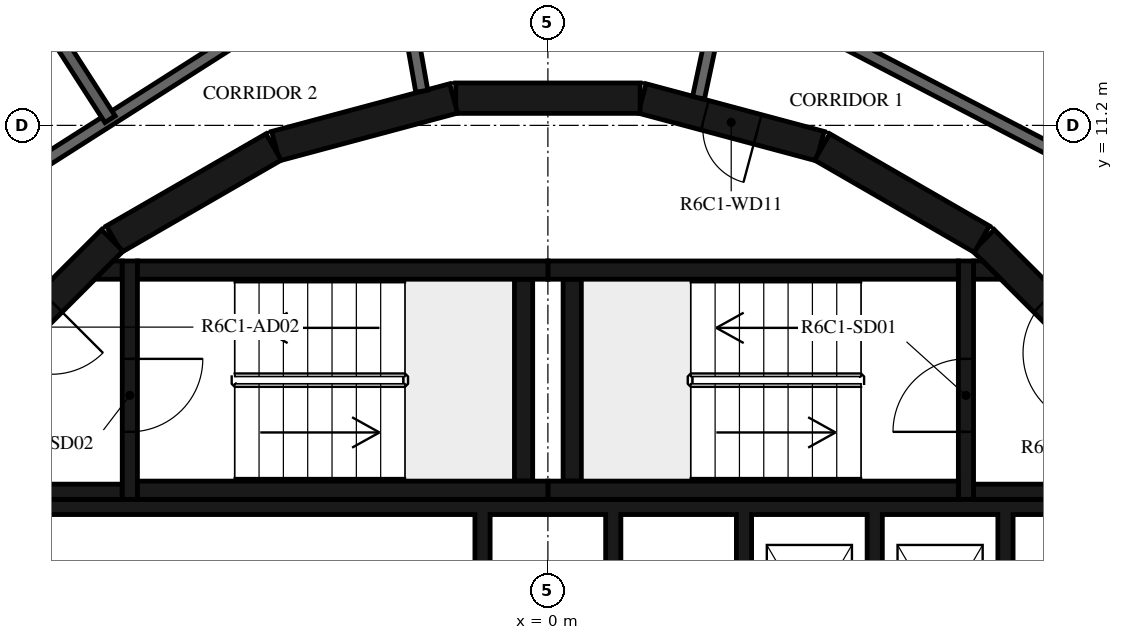
"""IFC4 building model, lengths in metres.
Left out: names, types, materials, properties, quantities, classifications, styles, units other than length and angle.
Written with IfcOpenShell. Run it as: python <this file> out.ifc"""

import sys

from ifc_helpers import new_model, si_unit, direction, frame, frame_2d, origin, place, context, subcontext, project, spatial, polyline, rectangle, outline, extrude, element, fill, save


model = new_model("IFC4")
c1 = context("Model", 3, precision=1e-05, world=origin(), true_north=direction((0.0, 1.0)))
c2 = subcontext(c1, "Body", "Model", "MODEL_VIEW")
j1 = project(units=[si_unit("LENGTHUNIT", "METRE"), si_unit("PLANEANGLEUNIT", "RADIAN")], contexts=[c1])
p1 = place(None, origin())
s1 = spatial("IfcSite", under=j1, at=p1, CompositionType="ELEMENT")
p2 = place(p1, origin())
s2 = spatial("IfcBuilding", under=s1, at=p2, CompositionType="ELEMENT")
p3 = place(p2, frame((0.0, 0.0, 251.2)))
s3 = spatial("IfcBuildingStorey", under=s2, at=p3, CompositionType="ELEMENT", Elevation=251.2)
p4 = place(p3, frame((9.308, 7.164, 0.0), z_axis=(0.0, 0.0, 1.0), x_axis=(-0.707106781187, 0.707106781187, 0.0)))
e1 = element("IfcWall", 1, at=p4, inside=s3, PredefinedType="SHEAR", context=c2, shape_type="SweptSolid", body=[
    extrude(rectangle(XDim=3.032, YDim=0.5, at=frame_2d((1.516, 0.0))), origin(), (0.0, 0.0, 1.0), 3.12),
])
p5 = place(p4, frame((0.416, 0.0, 0.0)))
e2 = element("IfcOpeningElement", 2, at=p5, cuts=e1, PredefinedType="OPENING", context=c2, shape_type="SweptSolid", body=[
    extrude(rectangle(XDim=1.2, YDim=2.1, at=frame_2d((0.6, 1.05))), frame((0.0, 0.26, 0.0), z_axis=(0.0, -1.0, 0.0), x_axis=(1.0, 0.0, 0.0)), (0.0, 0.0, 1.0), 0.52),
])
p6 = place(p3, frame((7.137, 9.329, 0.0), z_axis=(0.0, 0.0, 1.0), x_axis=(-0.865975092491, 0.500087131594, 0.0)))
e3 = element("IfcWall", 3, at=p6, inside=s3, PredefinedType="SHEAR", context=c2, shape_type="SweptSolid", body=[
    extrude(rectangle(XDim=3.033, YDim=0.5, at=frame_2d((1.516, 0.0))), origin(), (0.0, 0.0, 1.0), 3.12),
])
p7 = place(p3, frame((4.479, 10.858, 0.0), z_axis=(0.0, 0.0, 1.0), x_axis=(-0.965948410781, 0.258734743916, 0.0)))
e4 = element("IfcWall", 4, at=p7, inside=s3, PredefinedType="SHEAR", context=c2, shape_type="SweptSolid", body=[
    extrude(rectangle(XDim=3.033, YDim=0.5, at=frame_2d((1.516, 0.0))), origin(), (0.0, 0.0, 1.0), 3.12),
])
p8 = place(p7, frame((1.066, 0.0, 0.0)))
e5 = element("IfcOpeningElement", 5, at=p8, cuts=e4, PredefinedType="OPENING", context=c2, shape_type="SweptSolid", body=[
    extrude(rectangle(XDim=0.9, YDim=2.1, at=frame_2d((0.45, 1.05))), frame((0.0, 0.26, 0.0), z_axis=(0.0, -1.0, 0.0), x_axis=(1.0, 0.0, 0.0)), (0.0, 0.0, 1.0), 0.52),
])
for number, where, z_axis, x_axis in (
    (6, (1.516, 11.647, 0.0), (0.0, 0.0, 1.0), (-1.0, 0.0, 0.0)),
    (7, (-1.55, 11.643, 0.0), (0.0, 0.0, 1.0), (-0.966, -0.259, 0.0)),
    (8, (-4.51, 10.845, 0.0), (0.0, 0.0, 1.0), (-0.866, -0.5, 0.0)),
):
    element("IfcWall", number, at=place(p3, frame(where, z_axis=z_axis, x_axis=x_axis)), inside=s3, PredefinedType="SHEAR", context=c2, shape_type="SweptSolid", body=[
        extrude(rectangle(XDim=3.033, YDim=0.5, at=frame_2d((1.516, 0.0))), origin(), (0.0, 0.0, 1.0), 3.12),
    ])
p9 = place(p3, frame((-7.164, 9.308, 0.0), z_axis=(0.0, 0.0, 1.0), x_axis=(-0.707106781187, -0.707106781187, 0.0)))
e9 = element("IfcWall", 9, at=p9, inside=s3, PredefinedType="SHEAR", context=c2, shape_type="SweptSolid", body=[
    extrude(rectangle(XDim=3.032, YDim=0.5, at=frame_2d((1.516, 0.0))), origin(), (0.0, 0.0, 1.0), 3.12),
])
p10 = place(p9, frame((1.416, 0.0, 0.0)))
e10 = element("IfcOpeningElement", 10, at=p10, cuts=e9, PredefinedType="OPENING", context=c2, shape_type="SweptSolid", body=[
    extrude(rectangle(XDim=1.2, YDim=2.1, at=frame_2d((0.6, 1.05))), frame((0.0, 0.26, 0.0), z_axis=(0.0, -1.0, 0.0), x_axis=(1.0, 0.0, 0.0)), (0.0, 0.0, 1.0), 0.52),
])
for number, where, z_axis, x_axis in (
    (11, (0.0, 5.2, 0.0), (0.0, 0.0, 1.0), (1.0, 0.0, 0.0)),
    (12, (0.0, 8.82, 0.0), (0.0, 0.0, 1.0), (1.0, 0.0, 0.0)),
):
    element("IfcWall", number, at=place(p3, frame(where, z_axis=z_axis, x_axis=x_axis)), inside=s3, PredefinedType="SHEAR", context=c2, shape_type="SweptSolid", body=[
        extrude(rectangle(XDim=6.75, YDim=0.3, at=frame_2d((3.375, 0.0))), origin(), (0.0, 0.0, 1.0), 3.12),
    ])
p11 = place(p3, frame((0.4, 5.35, 0.0), z_axis=(0.0, 0.0, 1.0), x_axis=(0.0, 1.0, 0.0)))
e13 = element("IfcWall", 13, at=p11, inside=s3, PredefinedType="SHEAR", context=c2, shape_type="SweptSolid", body=[
    extrude(rectangle(XDim=3.32, YDim=0.3, at=frame_2d((1.66, 0.0))), origin(), (0.0, 0.0, 1.0), 3.12),
])
p12 = place(p3, frame((6.875, 5.05, 0.0), z_axis=(0.0, 0.0, 1.0), x_axis=(0.0, 1.0, 0.0)))
e14 = element("IfcWall", 14, at=p12, inside=s3, PredefinedType="SHEAR", context=c2, shape_type="SweptSolid", body=[
    extrude(rectangle(XDim=3.92, YDim=0.25, at=frame_2d((1.96, 0.0))), origin(), (0.0, 0.0, 1.0), 3.12),
])
p13 = place(p12, frame((1.11, 0.0, 0.0)))
e15 = element("IfcOpeningElement", 15, at=p13, cuts=e14, PredefinedType="OPENING", context=c2, shape_type="SweptSolid", body=[
    extrude(rectangle(XDim=1.2, YDim=2.1, at=frame_2d((0.6, 1.05))), frame((0.0, 0.135, 0.0), z_axis=(0.0, -1.0, 0.0), x_axis=(1.0, 0.0, 0.0)), (0.0, 0.0, 1.0), 0.27),
])
p14 = place(p3, frame((7.0, 5.175, 0.0), z_axis=(0.0, 0.0, 1.0), x_axis=(1.0, 0.0, 0.0)))
e16 = element("IfcWall", 16, at=p14, inside=s3, PredefinedType="SHEAR", context=c2, shape_type="SweptSolid", body=[
    extrude(rectangle(XDim=3.1, YDim=0.25, at=frame_2d((1.55, 0.0))), origin(), (0.0, 0.0, 1.0), 3.12),
])
p15 = place(p3, origin())
e17 = element("IfcWall", 17, at=p15, inside=s3, PredefinedType="SHEAR", context=c2, shape_type="SweptSolid", body=[
    extrude(outline(polyline([(7.448, 8.67), (7.0, 8.67), (7.0, 8.97), (7.148, 8.97), (7.448, 8.67)])), origin(), (0.0, 0.0, 1.0), 3.12),
])
for number, where, z_axis, x_axis in (
    (18, (-6.75, 5.2, 0.0), (0.0, 0.0, 1.0), (1.0, 0.0, 0.0)),
    (19, (-6.75, 8.82, 0.0), (0.0, 0.0, 1.0), (1.0, 0.0, 0.0)),
):
    element("IfcWall", number, at=place(p3, frame(where, z_axis=z_axis, x_axis=x_axis)), inside=s3, PredefinedType="SHEAR", context=c2, shape_type="SweptSolid", body=[
        extrude(rectangle(XDim=6.75, YDim=0.3, at=frame_2d((3.375, 0.0))), origin(), (0.0, 0.0, 1.0), 3.12),
    ])
p16 = place(p3, frame((-0.4, 5.35, 0.0), z_axis=(0.0, 0.0, 1.0), x_axis=(0.0, 1.0, 0.0)))
e20 = element("IfcWall", 20, at=p16, inside=s3, PredefinedType="SHEAR", context=c2, shape_type="SweptSolid", body=[
    extrude(rectangle(XDim=3.32, YDim=0.3, at=frame_2d((1.66, 0.0))), origin(), (0.0, 0.0, 1.0), 3.12),
])
p17 = place(p3, frame((-6.875, 8.97, 0.0), z_axis=(0.0, 0.0, 1.0), x_axis=(0.0, -1.0, 0.0)))
e21 = element("IfcWall", 21, at=p17, inside=s3, PredefinedType="SHEAR", context=c2, shape_type="SweptSolid", body=[
    extrude(rectangle(XDim=3.92, YDim=0.25, at=frame_2d((1.96, 0.0))), origin(), (0.0, 0.0, 1.0), 3.12),
])
p18 = place(p17, frame((1.61, 0.0, 0.0)))
e22 = element("IfcOpeningElement", 22, at=p18, cuts=e21, PredefinedType="OPENING", context=c2, shape_type="SweptSolid", body=[
    extrude(rectangle(XDim=1.2, YDim=2.1, at=frame_2d((0.6, 1.05))), frame((0.0, 0.135, 0.0), z_axis=(0.0, -1.0, 0.0), x_axis=(1.0, 0.0, 0.0)), (0.0, 0.0, 1.0), 0.27),
])
p19 = place(p3, frame((-7.0, 5.175, 0.0), z_axis=(0.0, 0.0, 1.0), x_axis=(-1.0, 0.0, 0.0)))
e23 = element("IfcWall", 23, at=p19, inside=s3, PredefinedType="SHEAR", context=c2, shape_type="SweptSolid", body=[
    extrude(rectangle(XDim=3.1, YDim=0.25, at=frame_2d((1.55, 0.0))), origin(), (0.0, 0.0, 1.0), 3.12),
])
p20 = place(p3, origin())
e24 = element("IfcWall", 24, at=p20, inside=s3, PredefinedType="SHEAR", context=c2, shape_type="SweptSolid", body=[
    extrude(outline(polyline([(-7.148, 8.97), (-7.0, 8.97), (-7.0, 8.67), (-7.448, 8.67), (-7.148, 8.97)])), origin(), (0.0, 0.0, 1.0), 3.12),
])
p21 = place(p3, origin())
e25 = element("IfcWall", 25, at=p21, inside=s3, PredefinedType="SHEAR", context=c2, shape_type="SweptSolid", body=[
    extrude(outline(polyline([(-9.55, 4.8), (-1.2, 4.8), (-1.2, 1.9), (-0.95, 1.9), (-0.95, 4.8), (0.95, 4.8), (0.95, 1.9), (1.2, 1.9), (1.2, 4.8), (3.1, 4.8), (3.1, 1.9), (3.35, 1.9), (3.35, 4.8), (5.25, 4.8), (5.25, 1.9), (5.5, 1.9), (5.5, 4.8), (7.4, 4.8), (7.4, 1.9), (7.65, 1.9), (7.65, 4.8), (9.55, 4.8), (9.55, 1.9), (9.8, 1.9), (9.8, 4.8), (9.8, 5.05), (-9.8, 5.05), (-9.8, 4.8), (-9.8, 1.9), (-9.55, 1.9), (-9.55, 4.8)])), origin(), (0.0, 0.0, 1.0), 3.12),
])
p22 = place(p3, frame((9.372, 10.228, 0.0), z_axis=(0.0, 0.0, 1.0), x_axis=(-0.887005184532, 0.461759464021, 0.0)))
e26 = element("IfcWall", 26, at=p22, inside=s3, PredefinedType="STANDARD", context=c2, shape_type="SweptSolid", body=[
    extrude(rectangle(XDim=7.181, YDim=0.2, at=frame_2d((3.591, 0.0))), origin(), (0.0, 0.0, 1.0), 3.12),
])
p23 = place(p3, frame((2.878, 13.538, 0.0), z_axis=(0.0, 0.0, 1.0), x_axis=(-0.207893604596, -0.978151444904, 0.0)))
e27 = element("IfcWall", 27, at=p23, inside=s3, PredefinedType="STANDARD", context=c2, shape_type="SweptSolid", body=[
    extrude(rectangle(XDim=1.927, YDim=0.2, at=frame_2d((0.963, 0.0))), origin(), (0.0, 0.0, 1.0), 3.12),
])
p24 = place(p3, frame((-2.074, 11.761, 0.0), z_axis=(0.0, 0.0, 1.0), x_axis=(-0.173679082312, 0.984802303189, 0.0)))
e28 = element("IfcWall", 28, at=p24, inside=s3, PredefinedType="STANDARD", context=c2, shape_type="SweptSolid", body=[
    extrude(rectangle(XDim=1.573, YDim=0.2, at=frame_2d((0.787, 0.0))), origin(), (0.0, 0.0, 1.0), 3.12),
])
p25 = place(p3, frame((-4.172, 13.231, 0.0), z_axis=(0.0, 0.0, 1.0), x_axis=(-0.843388394728, -0.537304397561, 0.0)))
e29 = element("IfcWall", 29, at=p25, inside=s3, PredefinedType="STANDARD", context=c2, shape_type="SweptSolid", body=[
    extrude(rectangle(XDim=7.181, YDim=0.2, at=frame_2d((3.59, 0.0))), origin(), (0.0, 0.0, 1.0), 3.12),
])
p26 = place(p3, frame((-9.69, 15.171, 0.0), z_axis=(0.0, 0.0, 1.0), x_axis=(0.540961372678, -0.841047438181, 0.0)))
e30 = element("IfcWall", 30, at=p26, inside=s3, PredefinedType="STANDARD", context=c2, shape_type="SweptSolid", body=[
    extrude(rectangle(XDim=4.602, YDim=0.2, at=frame_2d((2.301, 0.0))), origin(), (0.0, 0.0, 1.0), 3.12),
])
p27 = place(p3, frame((10.421, 11.373, 0.0), z_axis=(0.0, 0.0, 1.0), x_axis=(-0.887012970857, 0.461744506769, 0.0)))
e31 = element("IfcWall", 31, at=p27, inside=s3, PredefinedType="PARTITIONING", context=c2, shape_type="SweptSolid", body=[
    extrude(rectangle(XDim=7.985, YDim=0.12, at=frame_2d((3.992, 0.0))), origin(), (0.0, 0.0, 1.0), 3.12),
])
p28 = place(p27, frame((5.448, 0.0, 0.0)))
e32 = element("IfcOpeningElement", 32, at=p28, cuts=e31, PredefinedType="OPENING", context=c2, shape_type="SweptSolid", body=[
    extrude(rectangle(XDim=0.9, YDim=2.1, at=frame_2d((0.45, 1.05))), frame((0.0, 0.07, 0.0), z_axis=(0.0, -1.0, 0.0), x_axis=(1.0, 0.0, 0.0)), (0.0, 0.0, 1.0), 0.14),
])
p29 = place(p13, origin())
e33 = element("IfcDoor", 33, at=p29, inside=s3, OperationType="SINGLE_SWING_LEFT", PredefinedType="DOOR", context=c2, shape_type="SweptSolid", body=[
    extrude(rectangle(XDim=1.2, YDim=2.1, at=frame_2d((0.6, 1.05))), frame((0.0, 0.025, 0.0), z_axis=(0.0, -1.0, 0.0), x_axis=(1.0, 0.0, 0.0)), (0.0, 0.0, 1.0), 0.05),
])
fill(e15, e33)
p30 = place(p5, origin())
e34 = element("IfcDoor", 34, at=p30, inside=s3, OperationType="SINGLE_SWING_RIGHT", PredefinedType="DOOR", context=c2, shape_type="SweptSolid", body=[
    extrude(rectangle(XDim=1.2, YDim=2.1, at=frame_2d((0.6, 1.05))), frame((0.0, 0.025, 0.0), z_axis=(0.0, -1.0, 0.0), x_axis=(1.0, 0.0, 0.0)), (0.0, 0.0, 1.0), 0.05),
])
fill(e2, e34)
p31 = place(p18, origin())
e35 = element("IfcDoor", 35, at=p31, inside=s3, OperationType="SINGLE_SWING_LEFT", PredefinedType="DOOR", context=c2, shape_type="SweptSolid", body=[
    extrude(rectangle(XDim=1.2, YDim=2.1, at=frame_2d((0.6, 1.05))), frame((0.0, 0.025, 0.0), z_axis=(0.0, -1.0, 0.0), x_axis=(1.0, 0.0, 0.0)), (0.0, 0.0, 1.0), 0.05),
])
fill(e22, e35)
p32 = place(p10, origin())
e36 = element("IfcDoor", 36, at=p32, inside=s3, OperationType="SINGLE_SWING_RIGHT", PredefinedType="DOOR", context=c2, shape_type="SweptSolid", body=[
    extrude(rectangle(XDim=1.2, YDim=2.1, at=frame_2d((0.6, 1.05))), frame((0.0, 0.025, 0.0), z_axis=(0.0, -1.0, 0.0), x_axis=(1.0, 0.0, 0.0)), (0.0, 0.0, 1.0), 0.05),
])
fill(e10, e36)
p33 = place(p8, origin())
e37 = element("IfcDoor", 37, at=p33, inside=s3, OperationType="SINGLE_SWING_LEFT", PredefinedType="DOOR", context=c2, shape_type="SweptSolid", body=[
    extrude(rectangle(XDim=0.9, YDim=2.1, at=frame_2d((0.45, 1.05))), frame((0.0, 0.025, 0.0), z_axis=(0.0, -1.0, 0.0), x_axis=(1.0, 0.0, 0.0)), (0.0, 0.0, 1.0), 0.05),
])
fill(e5, e37)
save(model, sys.argv[1])
